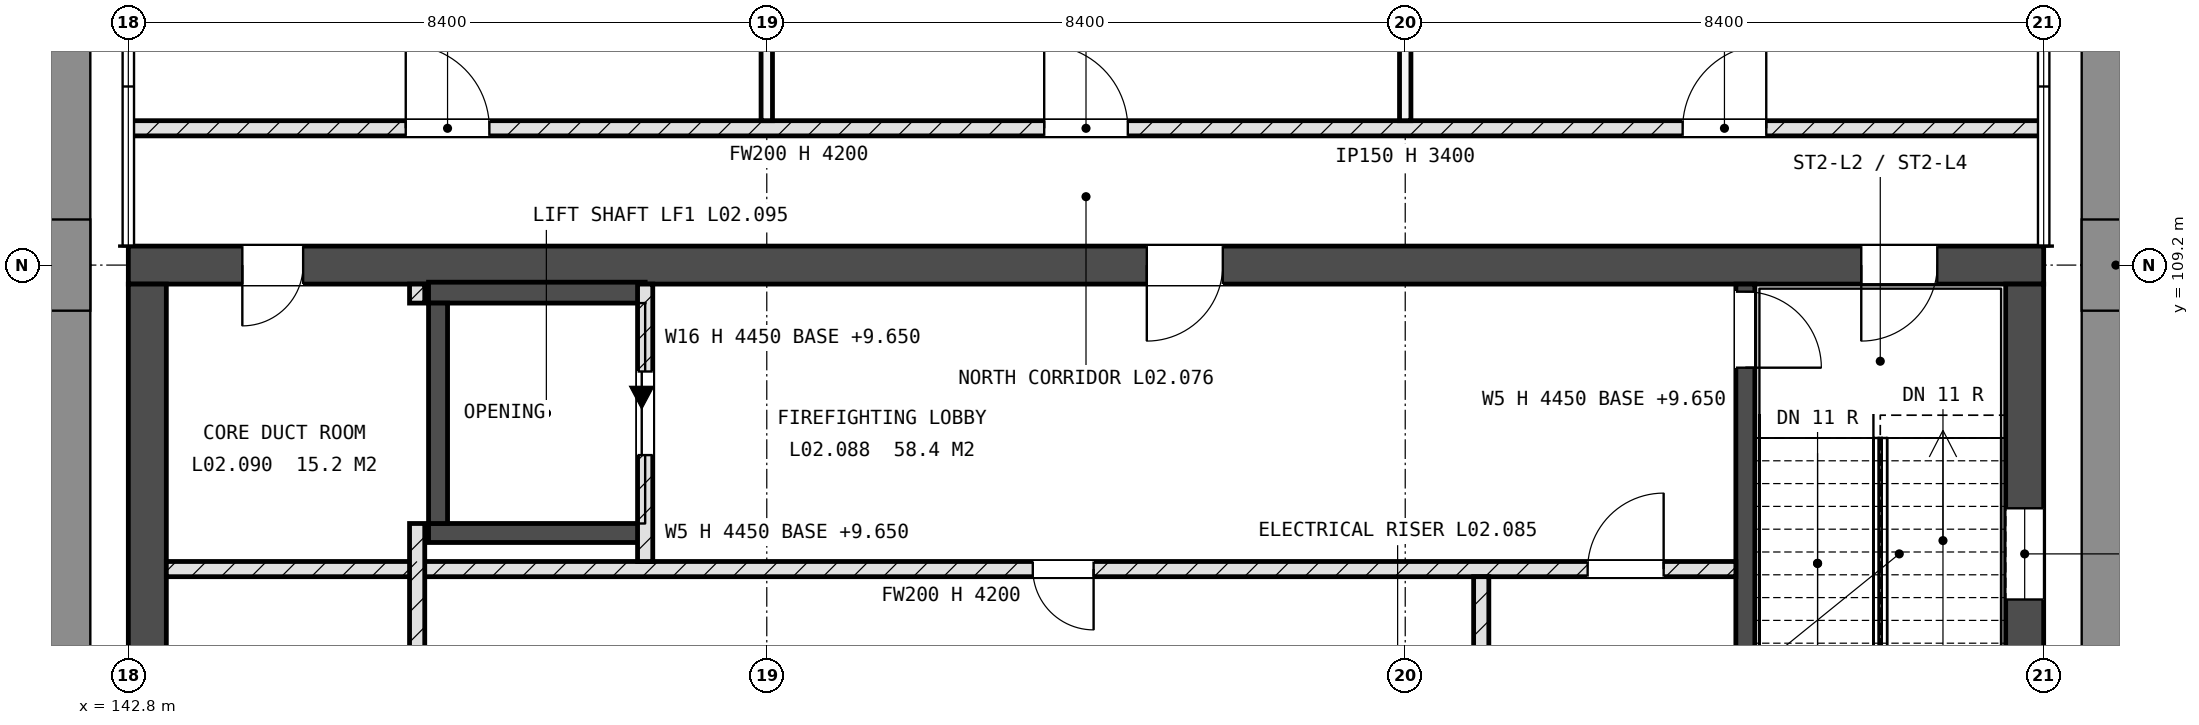
"""IFC4 building model, lengths in metres.
Left out: names, types, materials, properties, quantities, classifications, styles, units other than length and angle.
Written with IfcOpenShell. Run it as: python <this file> out.ifc"""

import sys

from ifc_helpers import new_model, si_unit, direction, frame, frame_2d, origin, place, context, subcontext, project, spatial, rectangle, extrude, element, fill, save


model = new_model("IFC4")
c1 = context("Model", 3, precision=1e-05, world=origin(), true_north=direction((0.0, 1.0)))
c2 = subcontext(c1, "Body", "Model", "MODEL_VIEW")
j1 = project(units=[si_unit("LENGTHUNIT", "METRE"), si_unit("PLANEANGLEUNIT", "RADIAN")], contexts=[c1])
p1 = place(None, origin())
s1 = spatial("IfcSite", under=j1, at=p1, CompositionType="ELEMENT")
p2 = place(p1, origin())
s2 = spatial("IfcBuilding", under=s1, at=p2, CompositionType="ELEMENT")
p3 = place(p2, frame((0.0, 0.0, 9.9)))
s3 = spatial("IfcBuildingStorey", under=s2, at=p3, CompositionType="ELEMENT", Elevation=9.9)
p4 = place(p3, frame((142.8, 109.2, -0.25), z_axis=(0.0, 0.0, 1.0), x_axis=(1.0, 0.0, 0.0)))
e1 = element("IfcWall", 1, at=p4, inside=s3, PredefinedType="SHEAR", context=c2, shape_type="SweptSolid", body=[
    extrude(rectangle(XDim=25.2, YDim=0.5, at=frame_2d((12.6, 0.0))), origin(), (0.0, 0.0, 1.0), 4.45),
])
p5 = place(p4, frame((22.8, 0.0, 0.25)))
e2 = element("IfcOpeningElement", 2, at=p5, cuts=e1, PredefinedType="OPENING", context=c2, shape_type="SweptSolid", body=[
    extrude(rectangle(XDim=1.0, YDim=2.1, at=frame_2d((0.5, 1.05))), frame((0.0, 0.26, 0.0), z_axis=(0.0, -1.0, 0.0), x_axis=(1.0, 0.0, 0.0)), (0.0, 0.0, 1.0), 0.52),
])
p6 = place(p4, frame((1.5, 0.0, 0.25)))
e3 = element("IfcOpeningElement", 3, at=p6, cuts=e1, PredefinedType="OPENING", context=c2, shape_type="SweptSolid", body=[
    extrude(rectangle(XDim=0.8, YDim=2.1, at=frame_2d((0.4, 1.05))), frame((0.0, 0.26, 0.0), z_axis=(0.0, -1.0, 0.0), x_axis=(1.0, 0.0, 0.0)), (0.0, 0.0, 1.0), 0.52),
])
p7 = place(p4, frame((13.4, 0.0, 0.25)))
e4 = element("IfcOpeningElement", 4, at=p7, cuts=e1, PredefinedType="OPENING", context=c2, shape_type="SweptSolid", body=[
    extrude(rectangle(XDim=1.0, YDim=2.1, at=frame_2d((0.5, 1.05))), frame((0.0, 0.26, 0.0), z_axis=(0.0, -1.0, 0.0), x_axis=(1.0, 0.0, 0.0)), (0.0, 0.0, 1.0), 0.52),
])
p8 = place(p3, frame((143.05, 92.65, -0.25), z_axis=(0.0, 0.0, 1.0), x_axis=(0.0, 1.0, 0.0)))
e5 = element("IfcWall", 5, at=p8, inside=s3, PredefinedType="SHEAR", context=c2, shape_type="SweptSolid", body=[
    extrude(rectangle(XDim=16.3, YDim=0.5, at=frame_2d((8.15, 0.0))), origin(), (0.0, 0.0, 1.0), 4.45),
])
p9 = place(p8, frame((2.95, 0.0, 1.85)))
e6 = element("IfcOpeningElement", 6, at=p9, cuts=e5, PredefinedType="OPENING", context=c2, shape_type="SweptSolid", body=[
    extrude(rectangle(XDim=1.2, YDim=0.9, at=frame_2d((0.6, 0.45))), frame((0.0, 0.26, 0.0), z_axis=(0.0, -1.0, 0.0), x_axis=(1.0, 0.0, 0.0)), (0.0, 0.0, 1.0), 0.52),
])
p10 = place(p3, frame((167.75, 92.65, -0.25), z_axis=(0.0, 0.0, 1.0), x_axis=(0.0, 1.0, 0.0)))
e7 = element("IfcWall", 7, at=p10, inside=s3, PredefinedType="SHEAR", context=c2, shape_type="SweptSolid", body=[
    extrude(rectangle(XDim=16.3, YDim=0.5, at=frame_2d((8.15, 0.0))), origin(), (0.0, 0.0, 1.0), 4.45),
])
p11 = place(p10, frame((12.15, 0.0, 1.85)))
e8 = element("IfcOpeningElement", 8, at=p11, cuts=e7, PredefinedType="OPENING", context=c2, shape_type="SweptSolid", body=[
    extrude(rectangle(XDim=1.2, YDim=0.9, at=frame_2d((0.6, 0.45))), frame((0.0, 0.26, 0.0), z_axis=(0.0, -1.0, 0.0), x_axis=(1.0, 0.0, 0.0)), (0.0, 0.0, 1.0), 0.52),
])
p12 = place(p3, frame((164.075, 101.35, -0.25), z_axis=(0.0, 0.0, 1.0), x_axis=(0.0, 1.0, 0.0)))
e9 = element("IfcWall", 9, at=p12, inside=s3, PredefinedType="SHEAR", context=c2, shape_type="SweptSolid", body=[
    extrude(rectangle(XDim=7.6, YDim=0.25, at=frame_2d((3.8, 0.0))), origin(), (0.0, 0.0, 1.0), 4.45),
])
p13 = place(p12, frame((6.5, 0.0, 0.25)))
e10 = element("IfcOpeningElement", 10, at=p13, cuts=e9, PredefinedType="OPENING", context=c2, shape_type="SweptSolid", body=[
    extrude(rectangle(XDim=1.0, YDim=2.1, at=frame_2d((0.5, 1.05))), frame((0.0, 0.135, 0.0), z_axis=(0.0, -1.0, 0.0), x_axis=(1.0, 0.0, 0.0)), (0.0, 0.0, 1.0), 0.27),
])
p14 = place(p3, frame((146.75, 105.675, -0.25), z_axis=(0.0, 0.0, 1.0), x_axis=(1.0, 0.0, 0.0)))
e11 = element("IfcWall", 11, at=p14, inside=s3, PredefinedType="SHEAR", context=c2, shape_type="SweptSolid", body=[
    extrude(rectangle(XDim=2.85, YDim=0.25, at=frame_2d((1.425, 0.0))), origin(), (0.0, 0.0, 1.0), 4.45),
])
p15 = place(p3, frame((146.75, 108.837, -0.25), z_axis=(0.0, 0.0, 1.0), x_axis=(1.0, 0.0, 0.0)))
e12 = element("IfcWall", 12, at=p15, inside=s3, PredefinedType="SHEAR", context=c2, shape_type="SweptSolid", body=[
    extrude(rectangle(XDim=2.85, YDim=0.275, at=frame_2d((1.425, 0.0))), origin(), (0.0, 0.0, 1.0), 4.45),
])
p16 = place(p3, frame((146.875, 105.8, -0.25), z_axis=(0.0, 0.0, 1.0), x_axis=(0.0, 1.0, 0.0)))
e13 = element("IfcWall", 13, at=p16, inside=s3, PredefinedType="SHEAR", context=c2, shape_type="SweptSolid", body=[
    extrude(rectangle(XDim=2.9, YDim=0.25, at=frame_2d((1.45, 0.0))), origin(), (0.0, 0.0, 1.0), 4.45),
])
p17 = place(p3, frame((143.3, 105.2, 0.0), z_axis=(0.0, 0.0, 1.0), x_axis=(1.0, 0.0, 0.0)))
e14 = element("IfcWall", 14, at=p17, inside=s3, PredefinedType="SOLIDWALL", context=c2, shape_type="SweptSolid", body=[
    extrude(rectangle(XDim=20.65, YDim=0.2, at=frame_2d((10.325, 0.0))), origin(), (0.0, 0.0, 1.0), 4.2),
])
p18 = place(p17, frame((11.4, 0.0, 0.0)))
e15 = element("IfcOpeningElement", 15, at=p18, cuts=e14, PredefinedType="OPENING", context=c2, shape_type="SweptSolid", body=[
    extrude(rectangle(XDim=0.8, YDim=2.1, at=frame_2d((0.4, 1.05))), frame((0.0, 0.11, 0.0), z_axis=(0.0, -1.0, 0.0), x_axis=(1.0, 0.0, 0.0)), (0.0, 0.0, 1.0), 0.22),
])
p19 = place(p17, frame((18.7, 0.0, 0.0)))
e16 = element("IfcOpeningElement", 16, at=p19, cuts=e14, PredefinedType="OPENING", context=c2, shape_type="SweptSolid", body=[
    extrude(rectangle(XDim=1.0, YDim=2.1, at=frame_2d((0.5, 1.05))), frame((0.0, 0.11, 0.0), z_axis=(0.0, -1.0, 0.0), x_axis=(1.0, 0.0, 0.0)), (0.0, 0.0, 1.0), 0.22),
])
p20 = place(p3, frame((142.8, 111.0, 0.0), z_axis=(0.0, 0.0, 1.0), x_axis=(1.0, 0.0, 0.0)))
e17 = element("IfcWall", 17, at=p20, inside=s3, PredefinedType="SOLIDWALL", context=c2, shape_type="SweptSolid", body=[
    extrude(rectangle(XDim=25.2, YDim=0.2, at=frame_2d((12.6, 0.0))), origin(), (0.0, 0.0, 1.0), 4.2),
])
p21 = place(p20, frame((3.65, 0.0, 0.0)))
e18 = element("IfcOpeningElement", 18, at=p21, cuts=e17, PredefinedType="OPENING", context=c2, shape_type="SweptSolid", body=[
    extrude(rectangle(XDim=1.1, YDim=2.25, at=frame_2d((0.55, 1.125))), frame((0.0, 0.11, 0.0), z_axis=(0.0, -1.0, 0.0), x_axis=(1.0, 0.0, 0.0)), (0.0, 0.0, 1.0), 0.22),
])
p22 = place(p20, frame((12.05, 0.0, 0.0)))
e19 = element("IfcOpeningElement", 19, at=p22, cuts=e17, PredefinedType="OPENING", context=c2, shape_type="SweptSolid", body=[
    extrude(rectangle(XDim=1.1, YDim=2.25, at=frame_2d((0.55, 1.125))), frame((0.0, 0.11, 0.0), z_axis=(0.0, -1.0, 0.0), x_axis=(1.0, 0.0, 0.0)), (0.0, 0.0, 1.0), 0.22),
])
p23 = place(p20, frame((20.45, 0.0, 0.0)))
e20 = element("IfcOpeningElement", 20, at=p23, cuts=e17, PredefinedType="OPENING", context=c2, shape_type="SweptSolid", body=[
    extrude(rectangle(XDim=1.1, YDim=2.25, at=frame_2d((0.55, 1.125))), frame((0.0, 0.11, 0.0), z_axis=(0.0, -1.0, 0.0), x_axis=(1.0, 0.0, 0.0)), (0.0, 0.0, 1.0), 0.22),
])
p24 = place(p3, frame((146.6, 100.5, 0.0), z_axis=(0.0, 0.0, 1.0), x_axis=(0.0, 1.0, 0.0)))
e21 = element("IfcWall", 21, at=p24, inside=s3, PredefinedType="SOLIDWALL", context=c2, shape_type="SweptSolid", body=[
    extrude(rectangle(XDim=5.3, YDim=0.2, at=frame_2d((2.65, 0.0))), origin(), (0.0, 0.0, 1.0), 4.2),
])
p25 = place(p24, frame((1.8, 0.0, 0.0)))
e22 = element("IfcOpeningElement", 22, at=p25, cuts=e21, PredefinedType="OPENING", context=c2, shape_type="SweptSolid", body=[
    extrude(rectangle(XDim=1.0, YDim=2.1, at=frame_2d((0.5, 1.05))), frame((0.0, 0.11, 0.0), z_axis=(0.0, -1.0, 0.0), x_axis=(1.0, 0.0, 0.0)), (0.0, 0.0, 1.0), 0.22),
])
p26 = place(p3, frame((146.6, 108.7, 0.0), z_axis=(0.0, 0.0, 1.0), x_axis=(0.0, 1.0, 0.0)))
e23 = element("IfcWall", 23, at=p26, inside=s3, PredefinedType="SOLIDWALL", context=c2, shape_type="SweptSolid", body=[
    extrude(rectangle(XDim=0.25, YDim=0.2, at=frame_2d((0.125, 0.0))), origin(), (0.0, 0.0, 1.0), 4.2),
])
p27 = place(p3, frame((149.6, 105.3, 0.0), z_axis=(0.0, 0.0, 1.0), x_axis=(0.0, 1.0, 0.0)))
e24 = element("IfcWall", 24, at=p27, inside=s3, PredefinedType="SOLIDWALL", context=c2, shape_type="SweptSolid", body=[
    extrude(rectangle(XDim=3.65, YDim=0.2, at=frame_2d((1.825, 0.0))), origin(), (0.0, 0.0, 1.0), 4.2),
])
p28 = place(p27, frame((1.4, 0.0, 0.0)))
e25 = element("IfcOpeningElement", 25, at=p28, cuts=e24, PredefinedType="OPENING", context=c2, shape_type="SweptSolid", body=[
    extrude(rectangle(XDim=1.1, YDim=2.1, at=frame_2d((0.55, 1.05))), frame((0.0, 0.11, 0.0), z_axis=(0.0, -1.0, 0.0), x_axis=(1.0, 0.0, 0.0)), (0.0, 0.0, 1.0), 0.22),
])
for number, where, z_axis, x_axis in (
    (26, (151.2, 111.1, 0.0), (0.0, 0.0, 1.0), (0.0, 1.0, 0.0)),
    (27, (159.6, 111.1, 0.0), (0.0, 0.0, 1.0), (0.0, 1.0, 0.0)),
):
    element("IfcWall", number, at=place(p3, frame(where, z_axis=z_axis, x_axis=x_axis)), inside=s3, PredefinedType="PARTITIONING", context=c2, shape_type="SweptSolid", body=[
        extrude(rectangle(XDim=6.5, YDim=0.15, at=frame_2d((3.25, 0.0))), origin(), (0.0, 0.0, 1.0), 3.4),
    ])
p29 = place(p3, frame((160.6, 92.65, 0.0), z_axis=(0.0, 0.0, 1.0), x_axis=(0.0, 1.0, 0.0)))
e28 = element("IfcWall", 28, at=p29, inside=s3, PredefinedType="SOLIDWALL", context=c2, shape_type="SweptSolid", body=[
    extrude(rectangle(XDim=12.45, YDim=0.2, at=frame_2d((6.225, 0.0))), origin(), (0.0, 0.0, 1.0), 4.2),
])
p30 = place(p29, frame((5.05, 0.0, 0.0)))
e29 = element("IfcOpeningElement", 29, at=p30, cuts=e28, PredefinedType="OPENING", context=c2, shape_type="SweptSolid", body=[
    extrude(rectangle(XDim=0.8, YDim=2.1, at=frame_2d((0.4, 1.05))), frame((0.0, 0.11, 0.0), z_axis=(0.0, -1.0, 0.0), x_axis=(1.0, 0.0, 0.0)), (0.0, 0.0, 1.0), 0.22),
])
p31 = place(p29, frame((0.75, 0.0, 0.0)))
e30 = element("IfcOpeningElement", 30, at=p31, cuts=e28, PredefinedType="OPENING", context=c2, shape_type="SweptSolid", body=[
    extrude(rectangle(XDim=1.0, YDim=2.1, at=frame_2d((0.5, 1.05))), frame((0.0, 0.11, 0.0), z_axis=(0.0, -1.0, 0.0), x_axis=(1.0, 0.0, 0.0)), (0.0, 0.0, 1.0), 0.22),
])
p32 = place(p11, origin())
e31 = element("IfcWindow", 31, at=p32, inside=s3, PartitioningType="SINGLE_PANEL", PredefinedType="WINDOW", context=c2, shape_type="SweptSolid", body=[
    extrude(rectangle(XDim=1.2, YDim=0.9, at=frame_2d((0.6, 0.45))), frame((0.0, 0.03, 0.0), z_axis=(0.0, -1.0, 0.0), x_axis=(1.0, 0.0, 0.0)), (0.0, 0.0, 1.0), 0.06),
])
fill(e8, e31)
p33 = place(p28, origin())
e32 = element("IfcDoor", 32, at=p33, inside=s3, OperationType="SLIDING_TO_LEFT", PredefinedType="DOOR", context=c2, shape_type="SweptSolid", body=[
    extrude(rectangle(XDim=1.1, YDim=2.1, at=frame_2d((0.55, 1.05))), frame((0.0, 0.025, 0.0), z_axis=(0.0, -1.0, 0.0), x_axis=(1.0, 0.0, 0.0)), (0.0, 0.0, 1.0), 0.05),
])
fill(e25, e32)
p34 = place(p13, origin())
e33 = element("IfcDoor", 33, at=p34, inside=s3, OperationType="SINGLE_SWING_LEFT", PredefinedType="DOOR", context=c2, shape_type="SweptSolid", body=[
    extrude(rectangle(XDim=1.0, YDim=2.1, at=frame_2d((0.5, 1.05))), frame((0.0, 0.025, 0.0), z_axis=(0.0, -1.0, 0.0), x_axis=(1.0, 0.0, 0.0)), (0.0, 0.0, 1.0), 0.05),
])
fill(e10, e33)
p35 = place(p5, origin())
e34 = element("IfcDoor", 34, at=p35, inside=s3, OperationType="SINGLE_SWING_LEFT", PredefinedType="DOOR", context=c2, shape_type="SweptSolid", body=[
    extrude(rectangle(XDim=1.0, YDim=2.1, at=frame_2d((0.5, 1.05))), frame((0.0, 0.025, 0.0), z_axis=(0.0, -1.0, 0.0), x_axis=(1.0, 0.0, 0.0)), (0.0, 0.0, 1.0), 0.05),
])
fill(e2, e34)
p36 = place(p21, origin())
e35 = element("IfcDoor", 35, at=p36, inside=s3, OperationType="SINGLE_SWING_RIGHT", PredefinedType="DOOR", context=c2, shape_type="SweptSolid", body=[
    extrude(rectangle(XDim=1.1, YDim=2.25, at=frame_2d((0.55, 1.125))), frame((0.0, 0.025, 0.0), z_axis=(0.0, -1.0, 0.0), x_axis=(1.0, 0.0, 0.0)), (0.0, 0.0, 1.0), 0.05),
])
fill(e18, e35)
p37 = place(p22, origin())
e36 = element("IfcDoor", 36, at=p37, inside=s3, OperationType="SINGLE_SWING_RIGHT", PredefinedType="DOOR", context=c2, shape_type="SweptSolid", body=[
    extrude(rectangle(XDim=1.1, YDim=2.25, at=frame_2d((0.55, 1.125))), frame((0.0, 0.025, 0.0), z_axis=(0.0, -1.0, 0.0), x_axis=(1.0, 0.0, 0.0)), (0.0, 0.0, 1.0), 0.05),
])
fill(e19, e36)
p38 = place(p23, origin())
e37 = element("IfcDoor", 37, at=p38, inside=s3, OperationType="SINGLE_SWING_LEFT", PredefinedType="DOOR", context=c2, shape_type="SweptSolid", body=[
    extrude(rectangle(XDim=1.1, YDim=2.25, at=frame_2d((0.55, 1.125))), frame((0.0, 0.025, 0.0), z_axis=(0.0, -1.0, 0.0), x_axis=(1.0, 0.0, 0.0)), (0.0, 0.0, 1.0), 0.05),
])
fill(e20, e37)
p39 = place(p18, origin())
e38 = element("IfcDoor", 38, at=p39, inside=s3, OperationType="SINGLE_SWING_RIGHT", PredefinedType="DOOR", context=c2, shape_type="SweptSolid", body=[
    extrude(rectangle(XDim=0.8, YDim=2.1, at=frame_2d((0.4, 1.05))), frame((0.0, 0.025, 0.0), z_axis=(0.0, -1.0, 0.0), x_axis=(1.0, 0.0, 0.0)), (0.0, 0.0, 1.0), 0.05),
])
fill(e15, e38)
p40 = place(p6, origin())
e39 = element("IfcDoor", 39, at=p40, inside=s3, OperationType="SINGLE_SWING_LEFT", PredefinedType="DOOR", context=c2, shape_type="SweptSolid", body=[
    extrude(rectangle(XDim=0.8, YDim=2.1, at=frame_2d((0.4, 1.05))), frame((0.0, 0.025, 0.0), z_axis=(0.0, -1.0, 0.0), x_axis=(1.0, 0.0, 0.0)), (0.0, 0.0, 1.0), 0.05),
])
fill(e3, e39)
p41 = place(p7, origin())
e40 = element("IfcDoor", 40, at=p41, inside=s3, OperationType="SINGLE_SWING_LEFT", PredefinedType="DOOR", context=c2, shape_type="SweptSolid", body=[
    extrude(rectangle(XDim=1.0, YDim=2.1, at=frame_2d((0.5, 1.05))), frame((0.0, 0.025, 0.0), z_axis=(0.0, -1.0, 0.0), x_axis=(1.0, 0.0, 0.0)), (0.0, 0.0, 1.0), 0.05),
])
fill(e4, e40)
p42 = place(p19, origin())
e41 = element("IfcDoor", 41, at=p42, inside=s3, OperationType="SINGLE_SWING_LEFT", PredefinedType="DOOR", context=c2, shape_type="SweptSolid", body=[
    extrude(rectangle(XDim=1.0, YDim=2.1, at=frame_2d((0.5, 1.05))), frame((0.0, 0.025, 0.0), z_axis=(0.0, -1.0, 0.0), x_axis=(1.0, 0.0, 0.0)), (0.0, 0.0, 1.0), 0.05),
])
fill(e16, e41)
save(model, sys.argv[1])
